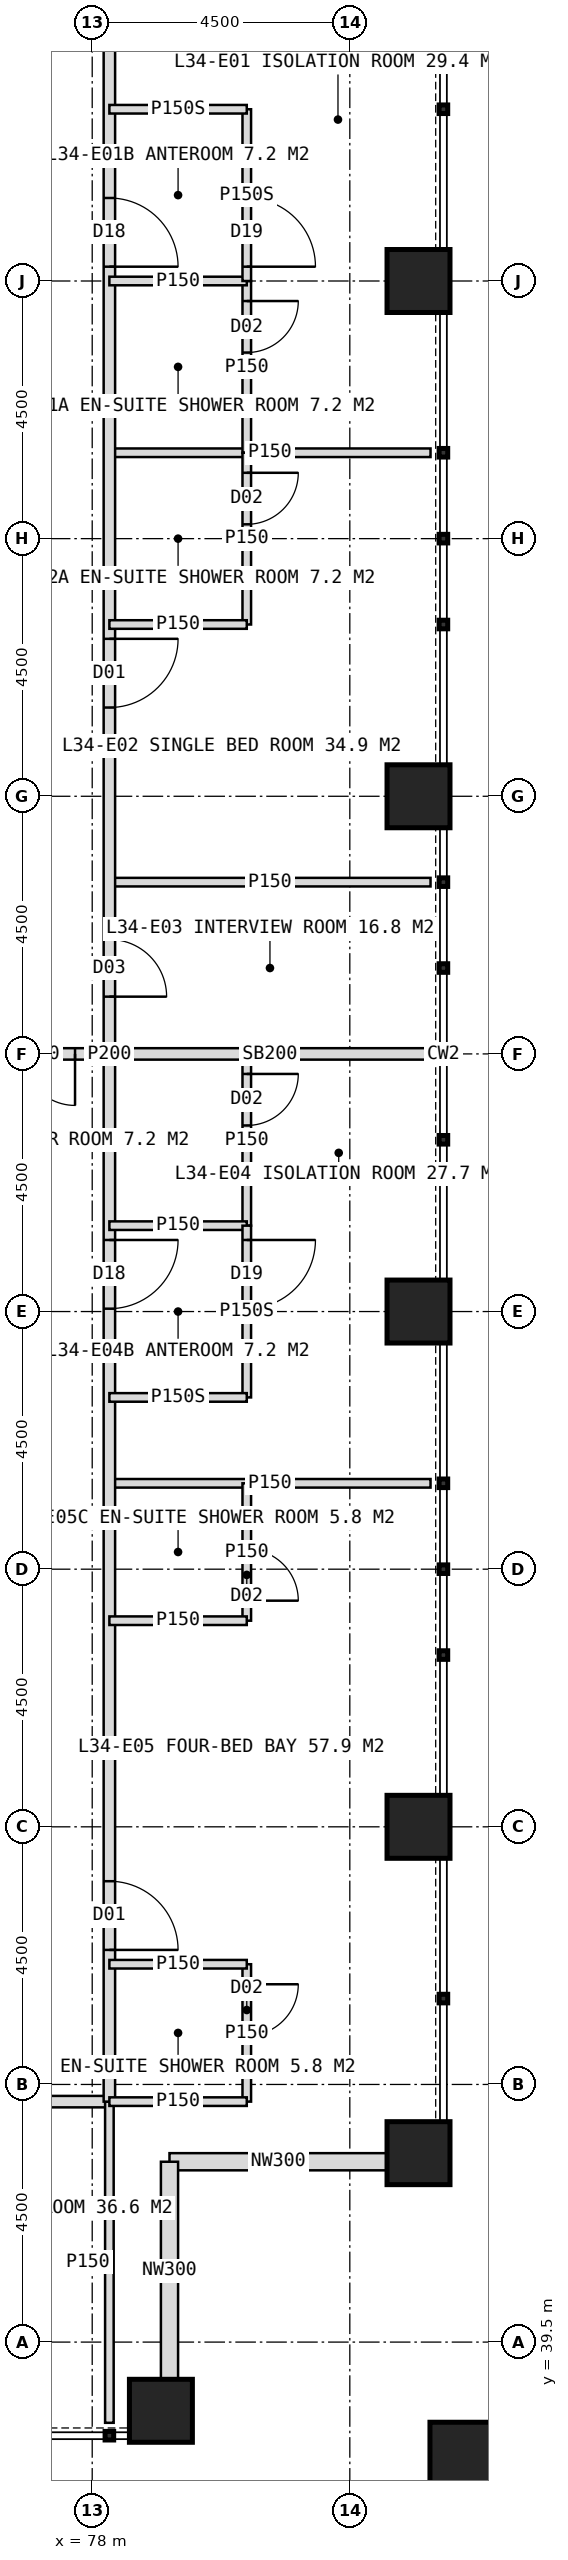
"""IFC4 building model, lengths in metres.
Left out: names, types, materials, properties, quantities, classifications, styles, units other than length and angle.
Written with IfcOpenShell. Run it as: python <this file> out.ifc"""

import sys

from ifc_helpers import new_model, si_unit, direction, frame, frame_2d, origin, origin_2d, place, context, subcontext, project, spatial, rectangle, hollow_rectangle, extrude, element, fill, save


model = new_model("IFC4")
c1 = context("Model", 3, precision=1e-05, world=origin(), true_north=direction((0.0, 1.0)))
c2 = subcontext(c1, "Body", "Model", "MODEL_VIEW")
j1 = project(units=[si_unit("LENGTHUNIT", "METRE"), si_unit("PLANEANGLEUNIT", "RADIAN")], contexts=[c1])
p1 = place(None, origin())
s1 = spatial("IfcSite", under=j1, at=p1, CompositionType="ELEMENT")
p2 = place(p1, origin())
s2 = spatial("IfcBuilding", under=s1, at=p2, CompositionType="ELEMENT")
p3 = place(p2, frame((0.0, 0.0, 144.0)))
s3 = spatial("IfcBuildingStorey", under=s2, at=p3, CompositionType="ELEMENT", Elevation=144.0)
for number, where, z_axis, x_axis in (
    (1, (83.7, 42.8, 0.0), (0.0, 0.0, 1.0), (1.0, 0.0, 0.0)),
    (2, (83.7, 48.5, 0.0), (0.0, 0.0, 1.0), (1.0, 0.0, 0.0)),
    (3, (83.7, 57.5, 0.0), (0.0, 0.0, 1.0), (1.0, 0.0, 0.0)),
    (4, (83.7, 66.5, 0.0), (0.0, 0.0, 1.0), (1.0, 0.0, 0.0)),
    (5, (83.7, 75.5, 0.0), (0.0, 0.0, 1.0), (1.0, 0.0, 0.0)),
    (6, (79.2, 38.3, 0.0), (0.0, 0.0, 1.0), (1.0, 0.0, 0.0)),
):
    element("IfcColumn", number, at=place(p3, frame(where, z_axis=z_axis, x_axis=x_axis)), inside=s3, PredefinedType="COLUMN", context=c2, shape_type="SweptSolid", body=[
        extrude(hollow_rectangle(XDim=1.1, YDim=1.1, WallThickness=0.1, at=origin_2d()), origin(), (0.0, 0.0, 1.0), 4.0),
    ])
p4 = place(p3, frame((84.6, 37.4, 0.0), z_axis=(0.0, 0.0, 1.0), x_axis=(1.0, 0.0, 0.0)))
e7 = element("IfcColumn", 7, at=p4, inside=s3, PredefinedType="COLUMN", context=c2, shape_type="SweptSolid", body=[
    extrude(hollow_rectangle(XDim=1.4, YDim=1.4, WallThickness=0.08, at=origin_2d()), origin(), (0.0, 0.0, 1.0), 4.0),
])
for number, where, z_axis, x_axis in (
    (8, (83.15, 42.65, 0.0), (0.0, 0.0, 1.0), (-1.0, 0.0, 0.0)),
    (9, (79.35, 42.65, 0.0), (0.0, 0.0, 1.0), (0.0, -1.0, 0.0)),
):
    element("IfcWall", number, at=place(p3, frame(where, z_axis=z_axis, x_axis=x_axis)), inside=s3, PredefinedType="ELEMENTEDWALL", context=c2, shape_type="SweptSolid", body=[
        extrude(rectangle(XDim=3.8, YDim=0.3, at=frame_2d((1.9, 0.0))), origin(), (0.0, 0.0, 1.0), 4.0),
    ])
p5 = place(p3, frame((78.3, 43.7, 0.0), z_axis=(0.0, 0.0, 1.0), x_axis=(-1.0, 0.0, 0.0)))
e10 = element("IfcWall", 10, at=p5, inside=s3, PredefinedType="PARTITIONING", context=c2, shape_type="SweptSolid", body=[
    extrude(rectangle(XDim=36.6, YDim=0.2, at=frame_2d((18.3, 0.0))), origin(), (0.0, 0.0, 1.0), 3.75),
])
p6 = place(p5, frame((3.35, 0.0, 0.0)))
e11 = element("IfcOpeningElement", 11, at=p6, cuts=e10, PredefinedType="OPENING", context=c2, shape_type="SweptSolid", body=[
    extrude(rectangle(XDim=1.2, YDim=2.2, at=frame_2d((0.6, 1.1))), frame((0.0, 0.11, 0.0), z_axis=(0.0, -1.0, 0.0), x_axis=(1.0, 0.0, 0.0)), (0.0, 0.0, 1.0), 0.22),
])
p7 = place(p5, frame((11.05, 0.0, 0.0)))
e12 = element("IfcOpeningElement", 12, at=p7, cuts=e10, PredefinedType="OPENING", context=c2, shape_type="SweptSolid", body=[
    extrude(rectangle(XDim=1.2, YDim=2.2, at=frame_2d((0.6, 1.1))), frame((0.0, 0.11, 0.0), z_axis=(0.0, -1.0, 0.0), x_axis=(1.0, 0.0, 0.0)), (0.0, 0.0, 1.0), 0.22),
])
p8 = place(p5, frame((19.85, 0.0, 0.0)))
e13 = element("IfcOpeningElement", 13, at=p8, cuts=e10, PredefinedType="OPENING", context=c2, shape_type="SweptSolid", body=[
    extrude(rectangle(XDim=1.2, YDim=2.2, at=frame_2d((0.6, 1.1))), frame((0.0, 0.11, 0.0), z_axis=(0.0, -1.0, 0.0), x_axis=(1.0, 0.0, 0.0)), (0.0, 0.0, 1.0), 0.22),
])
p9 = place(p5, frame((26.95, 0.0, 0.0)))
e14 = element("IfcOpeningElement", 14, at=p9, cuts=e10, PredefinedType="OPENING", context=c2, shape_type="SweptSolid", body=[
    extrude(rectangle(XDim=1.2, YDim=2.2, at=frame_2d((0.6, 1.1))), frame((0.0, 0.11, 0.0), z_axis=(0.0, -1.0, 0.0), x_axis=(1.0, 0.0, 0.0)), (0.0, 0.0, 1.0), 0.22),
])
for number, where, z_axis, x_axis in (
    (15, (78.3, 43.7, 0.0), (0.0, 0.0, 1.0), (0.0, -1.0, 0.0)),
    (16, (78.3, 72.5, 0.0), (0.0, 0.0, 1.0), (1.0, 0.0, 0.0)),
    (17, (78.3, 65.0, 0.0), (0.0, 0.0, 1.0), (1.0, 0.0, 0.0)),
):
    element("IfcWall", number, at=place(p3, frame(where, z_axis=z_axis, x_axis=x_axis)), inside=s3, PredefinedType="PARTITIONING", context=c2, shape_type="SweptSolid", body=[
        extrude(rectangle(XDim=5.61, YDim=0.15, at=frame_2d((2.805, 0.0))), origin(), (0.0, 0.0, 1.0), 3.75),
    ])
p10 = place(p3, frame((78.3, 62.0, 0.0), z_axis=(0.0, 0.0, 1.0), x_axis=(1.0, 0.0, 0.0)))
e18 = element("IfcWall", 18, at=p10, inside=s3, PredefinedType="SOLIDWALL", context=c2, shape_type="SweptSolid", body=[
    extrude(rectangle(XDim=5.61, YDim=0.2, at=frame_2d((2.805, 0.0))), origin(), (0.0, 0.0, 1.0), 2.95),
])
p11 = place(p3, frame((78.3, 54.5, 0.0), z_axis=(0.0, 0.0, 1.0), x_axis=(1.0, 0.0, 0.0)))
e19 = element("IfcWall", 19, at=p11, inside=s3, PredefinedType="PARTITIONING", context=c2, shape_type="SweptSolid", body=[
    extrude(rectangle(XDim=5.61, YDim=0.15, at=frame_2d((2.805, 0.0))), origin(), (0.0, 0.0, 1.0), 3.75),
])
p12 = place(p3, frame((78.3, 80.3, 0.0), z_axis=(0.0, 0.0, 1.0), x_axis=(0.0, -1.0, 0.0)))
e20 = element("IfcWall", 20, at=p12, inside=s3, PredefinedType="PARTITIONING", context=c2, shape_type="SweptSolid", body=[
    extrude(rectangle(XDim=36.6, YDim=0.2, at=frame_2d((18.3, 0.0))), origin(), (0.0, 0.0, 1.0), 3.75),
])
p13 = place(p12, frame((3.35, 0.0, 0.0)))
e21 = element("IfcOpeningElement", 21, at=p13, cuts=e20, PredefinedType="OPENING", context=c2, shape_type="SweptSolid", body=[
    extrude(rectangle(XDim=1.2, YDim=2.2, at=frame_2d((0.6, 1.1))), frame((0.0, 0.11, 0.0), z_axis=(0.0, -1.0, 0.0), x_axis=(1.0, 0.0, 0.0)), (0.0, 0.0, 1.0), 0.22),
])
p14 = place(p12, frame((11.05, 0.0, 0.0)))
e22 = element("IfcOpeningElement", 22, at=p14, cuts=e20, PredefinedType="OPENING", context=c2, shape_type="SweptSolid", body=[
    extrude(rectangle(XDim=1.2, YDim=2.2, at=frame_2d((0.6, 1.1))), frame((0.0, 0.11, 0.0), z_axis=(0.0, -1.0, 0.0), x_axis=(1.0, 0.0, 0.0)), (0.0, 0.0, 1.0), 0.22),
])
p15 = place(p12, frame((16.3, 0.0, 0.0)))
e23 = element("IfcOpeningElement", 23, at=p15, cuts=e20, PredefinedType="OPENING", context=c2, shape_type="SweptSolid", body=[
    extrude(rectangle(XDim=1.0, YDim=2.1, at=frame_2d((0.5, 1.05))), frame((0.0, 0.11, 0.0), z_axis=(0.0, -1.0, 0.0), x_axis=(1.0, 0.0, 0.0)), (0.0, 0.0, 1.0), 0.22),
])
p16 = place(p12, frame((21.55, 0.0, 0.0)))
e24 = element("IfcOpeningElement", 24, at=p16, cuts=e20, PredefinedType="OPENING", context=c2, shape_type="SweptSolid", body=[
    extrude(rectangle(XDim=1.2, YDim=2.2, at=frame_2d((0.6, 1.1))), frame((0.0, 0.11, 0.0), z_axis=(0.0, -1.0, 0.0), x_axis=(1.0, 0.0, 0.0)), (0.0, 0.0, 1.0), 0.22),
])
p17 = place(p12, frame((32.75, 0.0, 0.0)))
e25 = element("IfcOpeningElement", 25, at=p17, cuts=e20, PredefinedType="OPENING", context=c2, shape_type="SweptSolid", body=[
    extrude(rectangle(XDim=1.2, YDim=2.2, at=frame_2d((0.6, 1.1))), frame((0.0, 0.11, 0.0), z_axis=(0.0, -1.0, 0.0), x_axis=(1.0, 0.0, 0.0)), (0.0, 0.0, 1.0), 0.22),
])
p18 = place(p3, frame((80.7, 75.5, 0.0), z_axis=(0.0, 0.0, 1.0), x_axis=(0.0, -1.0, 0.0)))
e26 = element("IfcWall", 26, at=p18, inside=s3, PredefinedType="PARTITIONING", context=c2, shape_type="SweptSolid", body=[
    extrude(rectangle(XDim=3.0, YDim=0.15, at=frame_2d((1.5, 0.0))), origin(), (0.0, 0.0, 1.0), 3.75),
])
p19 = place(p18, frame((0.35, 0.0, 0.0)))
e27 = element("IfcOpeningElement", 27, at=p19, cuts=e26, PredefinedType="OPENING", context=c2, shape_type="SweptSolid", body=[
    extrude(rectangle(XDim=0.9, YDim=2.1, at=frame_2d((0.45, 1.05))), frame((0.0, 0.085, 0.0), z_axis=(0.0, -1.0, 0.0), x_axis=(1.0, 0.0, 0.0)), (0.0, 0.0, 1.0), 0.17),
])
p20 = place(p3, frame((78.3, 75.5, 0.0), z_axis=(0.0, 0.0, 1.0), x_axis=(1.0, 0.0, 0.0)))
e28 = element("IfcWall", 28, at=p20, inside=s3, PredefinedType="PARTITIONING", context=c2, shape_type="SweptSolid", body=[
    extrude(rectangle(XDim=2.4, YDim=0.15, at=frame_2d((1.2, 0.0))), origin(), (0.0, 0.0, 1.0), 2.95),
])
p21 = place(p3, frame((80.7, 78.5, 0.0), z_axis=(0.0, 0.0, 1.0), x_axis=(0.0, -1.0, 0.0)))
e29 = element("IfcWall", 29, at=p21, inside=s3, PredefinedType="PARTITIONING", context=c2, shape_type="SweptSolid", body=[
    extrude(rectangle(XDim=3.0, YDim=0.15, at=frame_2d((1.5, 0.0))), origin(), (0.0, 0.0, 1.0), 3.75),
])
p22 = place(p21, frame((1.55, 0.0, 0.0)))
e30 = element("IfcOpeningElement", 30, at=p22, cuts=e29, PredefinedType="OPENING", context=c2, shape_type="SweptSolid", body=[
    extrude(rectangle(XDim=1.2, YDim=2.2, at=frame_2d((0.6, 1.1))), frame((0.0, 0.085, 0.0), z_axis=(0.0, -1.0, 0.0), x_axis=(1.0, 0.0, 0.0)), (0.0, 0.0, 1.0), 0.17),
])
p23 = place(p3, frame((78.3, 78.5, 0.0), z_axis=(0.0, 0.0, 1.0), x_axis=(1.0, 0.0, 0.0)))
e31 = element("IfcWall", 31, at=p23, inside=s3, PredefinedType="PARTITIONING", context=c2, shape_type="SweptSolid", body=[
    extrude(rectangle(XDim=2.4, YDim=0.15, at=frame_2d((1.2, 0.0))), origin(), (0.0, 0.0, 1.0), 3.75),
])
p24 = place(p3, frame((80.7, 72.5, 0.0), z_axis=(0.0, 0.0, 1.0), x_axis=(0.0, -1.0, 0.0)))
e32 = element("IfcWall", 32, at=p24, inside=s3, PredefinedType="PARTITIONING", context=c2, shape_type="SweptSolid", body=[
    extrude(rectangle(XDim=3.0, YDim=0.15, at=frame_2d((1.5, 0.0))), origin(), (0.0, 0.0, 1.0), 3.75),
])
p25 = place(p24, frame((0.35, 0.0, 0.0)))
e33 = element("IfcOpeningElement", 33, at=p25, cuts=e32, PredefinedType="OPENING", context=c2, shape_type="SweptSolid", body=[
    extrude(rectangle(XDim=0.9, YDim=2.1, at=frame_2d((0.45, 1.05))), frame((0.0, 0.085, 0.0), z_axis=(0.0, -1.0, 0.0), x_axis=(1.0, 0.0, 0.0)), (0.0, 0.0, 1.0), 0.17),
])
p26 = place(p3, frame((78.3, 69.5, 0.0), z_axis=(0.0, 0.0, 1.0), x_axis=(1.0, 0.0, 0.0)))
e34 = element("IfcWall", 34, at=p26, inside=s3, PredefinedType="PARTITIONING", context=c2, shape_type="SweptSolid", body=[
    extrude(rectangle(XDim=2.4, YDim=0.15, at=frame_2d((1.2, 0.0))), origin(), (0.0, 0.0, 1.0), 3.75),
])
p27 = place(p3, frame((80.7, 62.0, 0.0), z_axis=(0.0, 0.0, 1.0), x_axis=(0.0, -1.0, 0.0)))
e35 = element("IfcWall", 35, at=p27, inside=s3, PredefinedType="PARTITIONING", context=c2, shape_type="SweptSolid", body=[
    extrude(rectangle(XDim=3.0, YDim=0.15, at=frame_2d((1.5, 0.0))), origin(), (0.0, 0.0, 1.0), 3.75),
])
p28 = place(p27, frame((0.35, 0.0, 0.0)))
e36 = element("IfcOpeningElement", 36, at=p28, cuts=e35, PredefinedType="OPENING", context=c2, shape_type="SweptSolid", body=[
    extrude(rectangle(XDim=0.9, YDim=2.1, at=frame_2d((0.45, 1.05))), frame((0.0, 0.085, 0.0), z_axis=(0.0, -1.0, 0.0), x_axis=(1.0, 0.0, 0.0)), (0.0, 0.0, 1.0), 0.17),
])
p29 = place(p3, frame((78.3, 59.0, 0.0), z_axis=(0.0, 0.0, 1.0), x_axis=(1.0, 0.0, 0.0)))
e37 = element("IfcWall", 37, at=p29, inside=s3, PredefinedType="PARTITIONING", context=c2, shape_type="SweptSolid", body=[
    extrude(rectangle(XDim=2.4, YDim=0.15, at=frame_2d((1.2, 0.0))), origin(), (0.0, 0.0, 1.0), 3.75),
])
p30 = place(p3, frame((80.7, 59.0, 0.0), z_axis=(0.0, 0.0, 1.0), x_axis=(0.0, -1.0, 0.0)))
e38 = element("IfcWall", 38, at=p30, inside=s3, PredefinedType="PARTITIONING", context=c2, shape_type="SweptSolid", body=[
    extrude(rectangle(XDim=3.0, YDim=0.15, at=frame_2d((1.5, 0.0))), origin(), (0.0, 0.0, 1.0), 3.75),
])
p31 = place(p30, frame((0.25, 0.0, 0.0)))
e39 = element("IfcOpeningElement", 39, at=p31, cuts=e38, PredefinedType="OPENING", context=c2, shape_type="SweptSolid", body=[
    extrude(rectangle(XDim=1.2, YDim=2.2, at=frame_2d((0.6, 1.1))), frame((0.0, 0.085, 0.0), z_axis=(0.0, -1.0, 0.0), x_axis=(1.0, 0.0, 0.0)), (0.0, 0.0, 1.0), 0.17),
])
p32 = place(p3, frame((78.3, 56.0, 0.0), z_axis=(0.0, 0.0, 1.0), x_axis=(1.0, 0.0, 0.0)))
e40 = element("IfcWall", 40, at=p32, inside=s3, PredefinedType="PARTITIONING", context=c2, shape_type="SweptSolid", body=[
    extrude(rectangle(XDim=2.4, YDim=0.15, at=frame_2d((1.2, 0.0))), origin(), (0.0, 0.0, 1.0), 3.75),
])
p33 = place(p3, frame((80.7, 46.1, 0.0), z_axis=(0.0, 0.0, 1.0), x_axis=(0.0, -1.0, 0.0)))
e41 = element("IfcWall", 41, at=p33, inside=s3, PredefinedType="PARTITIONING", context=c2, shape_type="SweptSolid", body=[
    extrude(rectangle(XDim=2.4, YDim=0.15, at=frame_2d((1.2, 0.0))), origin(), (0.0, 0.0, 1.0), 3.75),
])
p34 = place(p33, frame((0.35, 0.0, 0.0)))
e42 = element("IfcOpeningElement", 42, at=p34, cuts=e41, PredefinedType="OPENING", context=c2, shape_type="SweptSolid", body=[
    extrude(rectangle(XDim=0.9, YDim=2.1, at=frame_2d((0.45, 1.05))), frame((0.0, 0.085, 0.0), z_axis=(0.0, -1.0, 0.0), x_axis=(1.0, 0.0, 0.0)), (0.0, 0.0, 1.0), 0.17),
])
p35 = place(p3, frame((78.3, 46.1, 0.0), z_axis=(0.0, 0.0, 1.0), x_axis=(1.0, 0.0, 0.0)))
e43 = element("IfcWall", 43, at=p35, inside=s3, PredefinedType="PARTITIONING", context=c2, shape_type="SweptSolid", body=[
    extrude(rectangle(XDim=2.4, YDim=0.15, at=frame_2d((1.2, 0.0))), origin(), (0.0, 0.0, 1.0), 3.75),
])
p36 = place(p3, frame((80.7, 54.5, 0.0), z_axis=(0.0, 0.0, 1.0), x_axis=(0.0, -1.0, 0.0)))
e44 = element("IfcWall", 44, at=p36, inside=s3, PredefinedType="PARTITIONING", context=c2, shape_type="SweptSolid", body=[
    extrude(rectangle(XDim=2.4, YDim=0.15, at=frame_2d((1.2, 0.0))), origin(), (0.0, 0.0, 1.0), 3.75),
])
p37 = place(p36, frame((1.15, 0.0, 0.0)))
e45 = element("IfcOpeningElement", 45, at=p37, cuts=e44, PredefinedType="OPENING", context=c2, shape_type="SweptSolid", body=[
    extrude(rectangle(XDim=0.9, YDim=2.1, at=frame_2d((0.45, 1.05))), frame((0.0, 0.085, 0.0), z_axis=(0.0, -1.0, 0.0), x_axis=(1.0, 0.0, 0.0)), (0.0, 0.0, 1.0), 0.17),
])
for number, where, z_axis, x_axis in (
    (46, (78.3, 52.1, 0.0), (0.0, 0.0, 1.0), (1.0, 0.0, 0.0)),
    (47, (78.3, 43.7, 0.0), (0.0, 0.0, 1.0), (1.0, 0.0, 0.0)),
):
    element("IfcWall", number, at=place(p3, frame(where, z_axis=z_axis, x_axis=x_axis)), inside=s3, PredefinedType="PARTITIONING", context=c2, shape_type="SweptSolid", body=[
        extrude(rectangle(XDim=2.4, YDim=0.15, at=frame_2d((1.2, 0.0))), origin(), (0.0, 0.0, 1.0), 3.75),
    ])
p38 = place(p3, frame((75.6, 62.0, 0.0), z_axis=(0.0, 0.0, 1.0), x_axis=(1.0, 0.0, 0.0)))
e48 = element("IfcWall", 48, at=p38, inside=s3, PredefinedType="SOLIDWALL", context=c2, shape_type="SweptSolid", body=[
    extrude(rectangle(XDim=2.7, YDim=0.2, at=frame_2d((1.35, 0.0))), origin(), (0.0, 0.0, 1.0), 2.95),
])
p39 = place(p38, frame((0.3, 0.0, 0.0)))
e49 = element("IfcOpeningElement", 49, at=p39, cuts=e48, PredefinedType="OPENING", context=c2, shape_type="SweptSolid", body=[
    extrude(rectangle(XDim=1.8, YDim=2.2, at=frame_2d((0.9, 1.1))), frame((0.0, 0.11, 0.0), z_axis=(0.0, -1.0, 0.0), x_axis=(1.0, 0.0, 0.0)), (0.0, 0.0, 1.0), 0.22),
])
p40 = place(p22, origin())
e50 = element("IfcDoor", 50, at=p40, inside=s3, OperationType="SINGLE_SWING_RIGHT", PredefinedType="DOOR", context=c2, shape_type="SweptSolid", body=[
    extrude(rectangle(XDim=1.2, YDim=2.2, at=frame_2d((0.6, 1.1))), frame((0.0, 0.025, 0.0), z_axis=(0.0, -1.0, 0.0), x_axis=(1.0, 0.0, 0.0)), (0.0, 0.0, 1.0), 0.05),
])
fill(e30, e50)
p41 = place(p13, origin())
e51 = element("IfcDoor", 51, at=p41, inside=s3, OperationType="SINGLE_SWING_RIGHT", PredefinedType="DOOR", context=c2, shape_type="SweptSolid", body=[
    extrude(rectangle(XDim=1.2, YDim=2.2, at=frame_2d((0.6, 1.1))), frame((0.0, 0.025, 0.0), z_axis=(0.0, -1.0, 0.0), x_axis=(1.0, 0.0, 0.0)), (0.0, 0.0, 1.0), 0.05),
])
fill(e21, e51)
p42 = place(p19, origin())
e52 = element("IfcDoor", 52, at=p42, inside=s3, OperationType="SINGLE_SWING_LEFT", PredefinedType="DOOR", context=c2, shape_type="SweptSolid", body=[
    extrude(rectangle(XDim=0.9, YDim=2.1, at=frame_2d((0.45, 1.05))), frame((0.0, 0.025, 0.0), z_axis=(0.0, -1.0, 0.0), x_axis=(1.0, 0.0, 0.0)), (0.0, 0.0, 1.0), 0.05),
])
fill(e27, e52)
p43 = place(p14, origin())
e53 = element("IfcDoor", 53, at=p43, inside=s3, OperationType="SINGLE_SWING_LEFT", PredefinedType="DOOR", context=c2, shape_type="SweptSolid", body=[
    extrude(rectangle(XDim=1.2, YDim=2.2, at=frame_2d((0.6, 1.1))), frame((0.0, 0.025, 0.0), z_axis=(0.0, -1.0, 0.0), x_axis=(1.0, 0.0, 0.0)), (0.0, 0.0, 1.0), 0.05),
])
fill(e22, e53)
p44 = place(p25, origin())
e54 = element("IfcDoor", 54, at=p44, inside=s3, OperationType="SINGLE_SWING_LEFT", PredefinedType="DOOR", context=c2, shape_type="SweptSolid", body=[
    extrude(rectangle(XDim=0.9, YDim=2.1, at=frame_2d((0.45, 1.05))), frame((0.0, 0.025, 0.0), z_axis=(0.0, -1.0, 0.0), x_axis=(1.0, 0.0, 0.0)), (0.0, 0.0, 1.0), 0.05),
])
fill(e33, e54)
p45 = place(p15, origin())
e55 = element("IfcDoor", 55, at=p45, inside=s3, OperationType="SINGLE_SWING_RIGHT", PredefinedType="DOOR", context=c2, shape_type="SweptSolid", body=[
    extrude(rectangle(XDim=1.0, YDim=2.1, at=frame_2d((0.5, 1.05))), frame((0.0, 0.025, 0.0), z_axis=(0.0, -1.0, 0.0), x_axis=(1.0, 0.0, 0.0)), (0.0, 0.0, 1.0), 0.05),
])
fill(e23, e55)
p46 = place(p31, origin())
e56 = element("IfcDoor", 56, at=p46, inside=s3, OperationType="SINGLE_SWING_LEFT", PredefinedType="DOOR", context=c2, shape_type="SweptSolid", body=[
    extrude(rectangle(XDim=1.2, YDim=2.2, at=frame_2d((0.6, 1.1))), frame((0.0, 0.025, 0.0), z_axis=(0.0, -1.0, 0.0), x_axis=(1.0, 0.0, 0.0)), (0.0, 0.0, 1.0), 0.05),
])
fill(e39, e56)
p47 = place(p16, origin())
e57 = element("IfcDoor", 57, at=p47, inside=s3, OperationType="SINGLE_SWING_LEFT", PredefinedType="DOOR", context=c2, shape_type="SweptSolid", body=[
    extrude(rectangle(XDim=1.2, YDim=2.2, at=frame_2d((0.6, 1.1))), frame((0.0, 0.025, 0.0), z_axis=(0.0, -1.0, 0.0), x_axis=(1.0, 0.0, 0.0)), (0.0, 0.0, 1.0), 0.05),
])
fill(e24, e57)
p48 = place(p28, origin())
e58 = element("IfcDoor", 58, at=p48, inside=s3, OperationType="SINGLE_SWING_LEFT", PredefinedType="DOOR", context=c2, shape_type="SweptSolid", body=[
    extrude(rectangle(XDim=0.9, YDim=2.1, at=frame_2d((0.45, 1.05))), frame((0.0, 0.025, 0.0), z_axis=(0.0, -1.0, 0.0), x_axis=(1.0, 0.0, 0.0)), (0.0, 0.0, 1.0), 0.05),
])
fill(e36, e58)
p49 = place(p17, origin())
e59 = element("IfcDoor", 59, at=p49, inside=s3, OperationType="SINGLE_SWING_RIGHT", PredefinedType="DOOR", context=c2, shape_type="SweptSolid", body=[
    extrude(rectangle(XDim=1.2, YDim=2.2, at=frame_2d((0.6, 1.1))), frame((0.0, 0.025, 0.0), z_axis=(0.0, -1.0, 0.0), x_axis=(1.0, 0.0, 0.0)), (0.0, 0.0, 1.0), 0.05),
])
fill(e25, e59)
p50 = place(p34, origin())
e60 = element("IfcDoor", 60, at=p50, inside=s3, OperationType="SINGLE_SWING_LEFT", PredefinedType="DOOR", context=c2, shape_type="SweptSolid", body=[
    extrude(rectangle(XDim=0.9, YDim=2.1, at=frame_2d((0.45, 1.05))), frame((0.0, 0.025, 0.0), z_axis=(0.0, -1.0, 0.0), x_axis=(1.0, 0.0, 0.0)), (0.0, 0.0, 1.0), 0.05),
])
fill(e42, e60)
p51 = place(p37, origin())
e61 = element("IfcDoor", 61, at=p51, inside=s3, OperationType="SINGLE_SWING_RIGHT", PredefinedType="DOOR", context=c2, shape_type="SweptSolid", body=[
    extrude(rectangle(XDim=0.9, YDim=2.1, at=frame_2d((0.45, 1.05))), frame((0.0, 0.025, 0.0), z_axis=(0.0, -1.0, 0.0), x_axis=(1.0, 0.0, 0.0)), (0.0, 0.0, 1.0), 0.05),
])
fill(e45, e61)
p52 = place(p39, origin())
e62 = element("IfcDoor", 62, at=p52, inside=s3, OperationType="DOUBLE_DOOR_DOUBLE_SWING", PredefinedType="DOOR", context=c2, shape_type="SweptSolid", body=[
    extrude(rectangle(XDim=1.8, YDim=2.2, at=frame_2d((0.9, 1.1))), frame((0.0, 0.025, 0.0), z_axis=(0.0, -1.0, 0.0), x_axis=(1.0, 0.0, 0.0)), (0.0, 0.0, 1.0), 0.05),
])
fill(e49, e62)
save(model, sys.argv[1])
